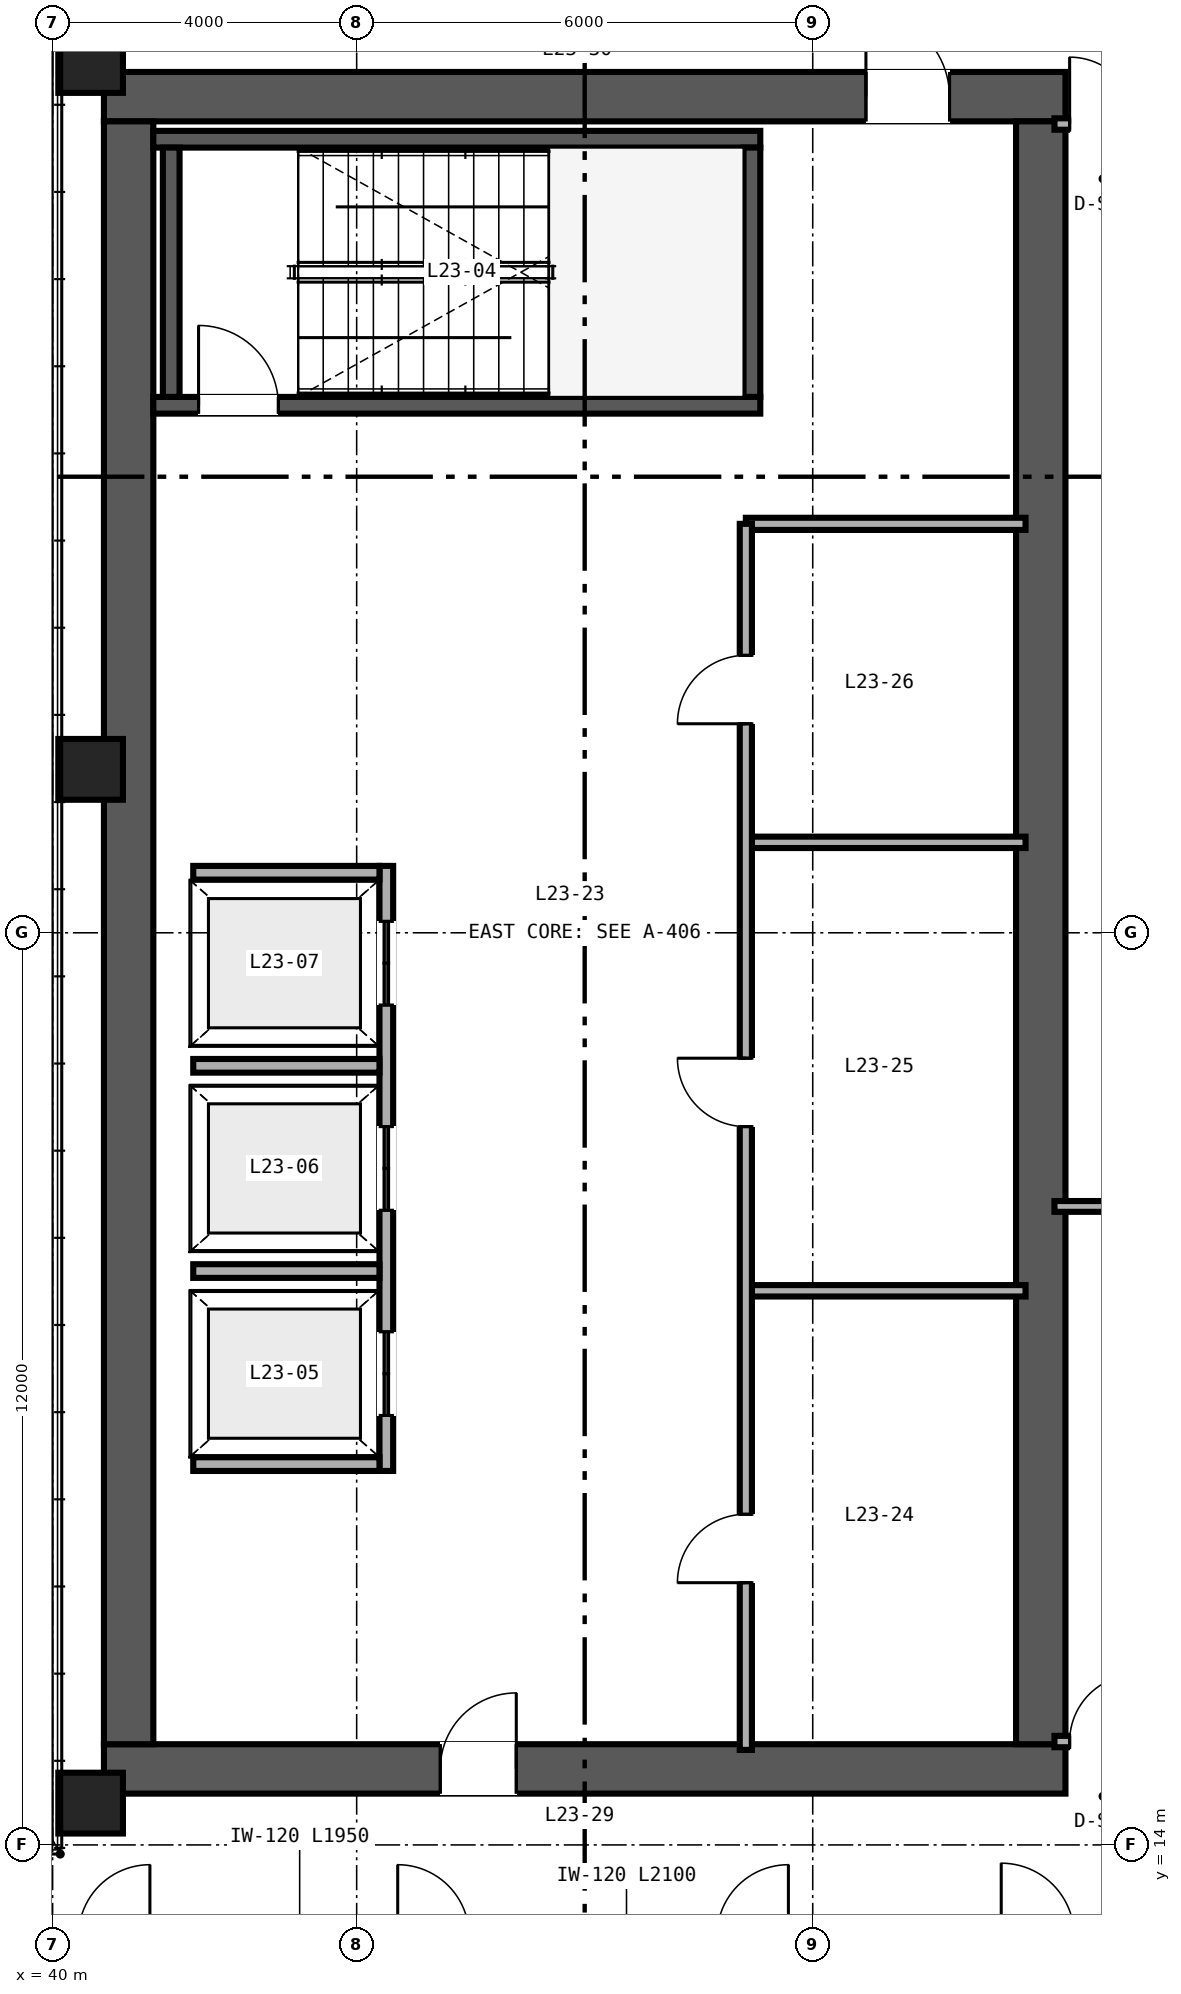
"""IFC4 building model, lengths in metres.
Left out: names, types, materials, properties, quantities, classifications, styles, units other than length and angle.
Written with IfcOpenShell. Run it as: python <this file> out.ifc"""

import sys

from ifc_helpers import new_model, si_unit, direction, frame, frame_2d, origin, origin_2d, place, context, subcontext, project, spatial, rectangle, hollow_rectangle, extrude, source, transform, mapped, element, fill, save


model = new_model("IFC4")
c1 = context("Model", 3, precision=1e-05, world=origin(), true_north=direction((0.0, 1.0)))
c2 = subcontext(c1, "Body", "Model", "MODEL_VIEW")
j1 = project(units=[si_unit("LENGTHUNIT", "METRE"), si_unit("PLANEANGLEUNIT", "RADIAN")], contexts=[c1])
p1 = place(None, origin())
s1 = spatial("IfcSite", under=j1, at=p1, CompositionType="ELEMENT")
p2 = place(p1, origin())
s2 = spatial("IfcBuilding", under=s1, at=p2, CompositionType="ELEMENT")
p3 = place(p2, frame((0.0, 0.0, 97.2)))
s3 = spatial("IfcBuildingStorey", under=s2, at=p3, CompositionType="ELEMENT", Elevation=97.2)
p4 = place(p3, frame((40.675, 15.0, 0.0), z_axis=(0.0, 0.0, 1.0), x_axis=(1.0, 0.0, 0.0)))
e1 = element("IfcWall", 1, at=p4, inside=s3, PredefinedType="SHEAR", context=c2, shape_type="SweptSolid", body=[
    extrude(rectangle(XDim=12.65, YDim=0.65, at=frame_2d((6.325, 0.0))), origin(), (0.0, 0.0, 1.0), 3.36),
])
p5 = place(p4, frame((4.425, 0.0, 0.0)))
e2 = element("IfcOpeningElement", 2, at=p5, cuts=e1, PredefinedType="OPENING", context=c2, shape_type="SweptSolid", body=[
    extrude(rectangle(XDim=1.0, YDim=2.15, at=frame_2d((0.5, 1.075))), frame((0.0, 0.335, 0.0), z_axis=(0.0, -1.0, 0.0), x_axis=(1.0, 0.0, 0.0)), (0.0, 0.0, 1.0), 0.67),
])
p6 = place(p3, frame((40.675, 37.0, 0.0), z_axis=(0.0, 0.0, 1.0), x_axis=(1.0, 0.0, 0.0)))
e3 = element("IfcWall", 3, at=p6, inside=s3, PredefinedType="SHEAR", context=c2, shape_type="SweptSolid", body=[
    extrude(rectangle(XDim=12.65, YDim=0.65, at=frame_2d((6.325, 0.0))), origin(), (0.0, 0.0, 1.0), 3.36),
])
p7 = place(p6, frame((10.025, 0.0, 0.0)))
e4 = element("IfcOpeningElement", 4, at=p7, cuts=e3, PredefinedType="OPENING", context=c2, shape_type="SweptSolid", body=[
    extrude(rectangle(XDim=1.1, YDim=2.15, at=frame_2d((0.55, 1.075))), frame((0.0, 0.335, 0.0), z_axis=(0.0, -1.0, 0.0), x_axis=(1.0, 0.0, 0.0)), (0.0, 0.0, 1.0), 0.67),
])
for number, where, z_axis, x_axis in (
    (5, (41.0, 15.325, 0.0), (0.0, 0.0, 1.0), (0.0, 1.0, 0.0)),
    (6, (53.0, 15.325, 0.0), (0.0, 0.0, 1.0), (0.0, 1.0, 0.0)),
):
    element("IfcWall", number, at=place(p3, frame(where, z_axis=z_axis, x_axis=x_axis)), inside=s3, PredefinedType="SHEAR", context=c2, shape_type="SweptSolid", body=[
        extrude(rectangle(XDim=21.35, YDim=0.65, at=frame_2d((10.675, 0.0))), origin(), (0.0, 0.0, 1.0), 3.36),
    ])
p8 = place(p3, frame((41.325, 32.94, 0.0), z_axis=(0.0, 0.0, 1.0), x_axis=(1.0, 0.0, 0.0)))
e7 = element("IfcWall", 7, at=p8, inside=s3, PredefinedType="SHEAR", context=c2, shape_type="SweptSolid", body=[
    extrude(rectangle(XDim=7.985, YDim=0.22, at=frame_2d((3.993, 0.0))), origin(), (0.0, 0.0, 1.0), 3.4),
])
p9 = place(p8, frame((0.595, 0.0, 0.0)))
e8 = element("IfcOpeningElement", 8, at=p9, cuts=e7, PredefinedType="OPENING", context=c2, shape_type="SweptSolid", body=[
    extrude(rectangle(XDim=1.05, YDim=2.15, at=frame_2d((0.525, 1.075))), frame((0.0, 0.12, 0.0), z_axis=(0.0, -1.0, 0.0), x_axis=(1.0, 0.0, 0.0)), (0.0, 0.0, 1.0), 0.24),
])
p10 = place(p3, frame((41.325, 36.44, 0.0), z_axis=(0.0, 0.0, 1.0), x_axis=(1.0, 0.0, 0.0)))
e9 = element("IfcWall", 9, at=p10, inside=s3, PredefinedType="SHEAR", context=c2, shape_type="SweptSolid", body=[
    extrude(rectangle(XDim=7.985, YDim=0.22, at=frame_2d((3.993, 0.0))), origin(), (0.0, 0.0, 1.0), 3.4),
])
for number, where, z_axis, x_axis in (
    (10, (41.56, 33.05, 0.0), (0.0, 0.0, 1.0), (0.0, 1.0, 0.0)),
    (11, (49.2, 33.05, 0.0), (0.0, 0.0, 1.0), (0.0, 1.0, 0.0)),
):
    element("IfcWall", number, at=place(p3, frame(where, z_axis=z_axis, x_axis=x_axis)), inside=s3, PredefinedType="SHEAR", context=c2, shape_type="SweptSolid", body=[
        extrude(rectangle(XDim=3.28, YDim=0.22, at=frame_2d((1.64, 0.0))), origin(), (0.0, 0.0, 1.0), 3.4),
    ])
m1 = source(origin(), c2, "Body", "SweptSolid", [
    extrude(hollow_rectangle(XDim=0.85, YDim=0.8, WallThickness=0.032, at=origin_2d()), origin(), (0.0, 0.0, 1.0), 3.36),
])
for number, where, z_axis, x_axis in (
    (12, (40.5, 14.55, 0.0), (0.0, 0.0, 1.0), (1.0, 0.0, 0.0)),
    (13, (40.5, 28.15, 0.0), (0.0, 0.0, 1.0), (1.0, 0.0, 0.0)),
    (14, (40.5, 37.45, 0.0), (0.0, 0.0, 1.0), (1.0, 0.0, 0.0)),
):
    element("IfcColumn", number, at=place(p3, frame(where, z_axis=z_axis, x_axis=x_axis)), inside=s3, PredefinedType="COLUMN", context=c2, shape_type="MappedRepresentation", body=[
        mapped(m1, transform((0.0, 0.0, 0.0), scale=1.0)),
    ])
p11 = place(p3, frame((44.39, 18.92, 0.0), z_axis=(0.0, 0.0, 1.0), x_axis=(0.0, 1.0, 0.0)))
e15 = element("IfcWall", 15, at=p11, inside=s3, PredefinedType="SOLIDWALL", context=c2, shape_type="SweptSolid", body=[
    extrude(rectangle(XDim=7.96, YDim=0.18, at=frame_2d((3.98, 0.0))), origin(), (0.0, 0.0, 1.0), 3.36),
])
p12 = place(p11, frame((0.73, 0.0, 0.0)))
e16 = element("IfcOpeningElement", 16, at=p12, cuts=e15, PredefinedType="OPENING", context=c2, shape_type="SweptSolid", body=[
    extrude(rectangle(XDim=1.1, YDim=2.2, at=frame_2d((0.55, 1.1))), frame((0.0, 0.1, 0.0), z_axis=(0.0, -1.0, 0.0), x_axis=(1.0, 0.0, 0.0)), (0.0, 0.0, 1.0), 0.2),
])
p13 = place(p11, frame((3.43, 0.0, 0.0)))
e17 = element("IfcOpeningElement", 17, at=p13, cuts=e15, PredefinedType="OPENING", context=c2, shape_type="SweptSolid", body=[
    extrude(rectangle(XDim=1.1, YDim=2.2, at=frame_2d((0.55, 1.1))), frame((0.0, 0.1, 0.0), z_axis=(0.0, -1.0, 0.0), x_axis=(1.0, 0.0, 0.0)), (0.0, 0.0, 1.0), 0.2),
])
p14 = place(p11, frame((6.13, 0.0, 0.0)))
e18 = element("IfcOpeningElement", 18, at=p14, cuts=e15, PredefinedType="OPENING", context=c2, shape_type="SweptSolid", body=[
    extrude(rectangle(XDim=1.1, YDim=2.2, at=frame_2d((0.55, 1.1))), frame((0.0, 0.1, 0.0), z_axis=(0.0, -1.0, 0.0), x_axis=(1.0, 0.0, 0.0)), (0.0, 0.0, 1.0), 0.2),
])
for number, where, z_axis, x_axis in (
    (19, (41.85, 19.01, 0.0), (0.0, 0.0, 1.0), (1.0, 0.0, 0.0)),
    (20, (41.85, 26.79, 0.0), (0.0, 0.0, 1.0), (1.0, 0.0, 0.0)),
    (21, (41.85, 21.55, 0.0), (0.0, 0.0, 1.0), (1.0, 0.0, 0.0)),
    (22, (41.85, 24.25, 0.0), (0.0, 0.0, 1.0), (1.0, 0.0, 0.0)),
):
    element("IfcWall", number, at=place(p3, frame(where, z_axis=z_axis, x_axis=x_axis)), inside=s3, PredefinedType="SOLIDWALL", context=c2, shape_type="SweptSolid", body=[
        extrude(rectangle(XDim=2.45, YDim=0.18, at=frame_2d((1.225, 0.0))), origin(), (0.0, 0.0, 1.0), 3.36),
    ])
p15 = place(p3, frame((49.12, 31.38, 0.0), z_axis=(0.0, 0.0, 1.0), x_axis=(1.0, 0.0, 0.0)))
e23 = element("IfcWall", 23, at=p15, inside=s3, PredefinedType="PARTITIONING", context=c2, shape_type="SweptSolid", body=[
    extrude(rectangle(XDim=3.68, YDim=0.16, at=frame_2d((1.84, 0.0))), origin(), (0.0, 0.0, 1.0), 2.36),
])
for number, where, z_axis, x_axis in (
    (24, (49.12, 21.29, 0.0), (0.0, 0.0, 1.0), (1.0, 0.0, 0.0)),
    (25, (49.12, 27.19, 0.0), (0.0, 0.0, 1.0), (1.0, 0.0, 0.0)),
):
    element("IfcWall", number, at=place(p3, frame(where, z_axis=z_axis, x_axis=x_axis)), inside=s3, PredefinedType="PARTITIONING", context=c2, shape_type="SweptSolid", body=[
        extrude(rectangle(XDim=3.68, YDim=0.15, at=frame_2d((1.84, 0.0))), origin(), (0.0, 0.0, 1.0), 3.36),
    ])
p16 = place(p3, frame((49.12, 15.25, 0.0), z_axis=(0.0, 0.0, 1.0), x_axis=(0.0, 1.0, 0.0)))
e26 = element("IfcWall", 26, at=p16, inside=s3, PredefinedType="PARTITIONING", context=c2, shape_type="SweptSolid", body=[
    extrude(rectangle(XDim=16.13, YDim=0.16, at=frame_2d((8.065, 0.0))), origin(), (0.0, 0.0, 1.0), 2.36),
])
p17 = place(p16, frame((2.2, 0.0, 0.0)))
e27 = element("IfcOpeningElement", 27, at=p17, cuts=e26, PredefinedType="OPENING", context=c2, shape_type="SweptSolid", body=[
    extrude(rectangle(XDim=0.9, YDim=2.15, at=frame_2d((0.45, 1.075))), frame((0.0, 0.09, 0.0), z_axis=(0.0, -1.0, 0.0), x_axis=(1.0, 0.0, 0.0)), (0.0, 0.0, 1.0), 0.18),
])
p18 = place(p16, frame((8.2, 0.0, 0.0)))
e28 = element("IfcOpeningElement", 28, at=p18, cuts=e26, PredefinedType="OPENING", context=c2, shape_type="SweptSolid", body=[
    extrude(rectangle(XDim=0.9, YDim=2.15, at=frame_2d((0.45, 1.075))), frame((0.0, 0.09, 0.0), z_axis=(0.0, -1.0, 0.0), x_axis=(1.0, 0.0, 0.0)), (0.0, 0.0, 1.0), 0.18),
])
p19 = place(p16, frame((13.5, 0.0, 0.0)))
e29 = element("IfcOpeningElement", 29, at=p19, cuts=e26, PredefinedType="OPENING", context=c2, shape_type="SweptSolid", body=[
    extrude(rectangle(XDim=0.9, YDim=2.15, at=frame_2d((0.45, 1.075))), frame((0.0, 0.09, 0.0), z_axis=(0.0, -1.0, 0.0), x_axis=(1.0, 0.0, 0.0)), (0.0, 0.0, 1.0), 0.18),
])
p20 = place(p3, frame((53.18, 15.36, 0.0), z_axis=(0.0, 0.0, 1.0), x_axis=(1.0, 0.0, 0.0)))
e30 = element("IfcWall", 30, at=p20, inside=s3, PredefinedType="PARTITIONING", context=c2, shape_type="SweptSolid", body=[
    extrude(rectangle(XDim=2.66, YDim=0.15, at=frame_2d((1.33, 0.0))), origin(), (0.0, 0.0, 1.0), 2.581),
])
p21 = place(p20, frame((0.2, 0.0, 0.0)))
e31 = element("IfcOpeningElement", 31, at=p21, cuts=e30, PredefinedType="OPENING", context=c2, shape_type="SweptSolid", body=[
    extrude(rectangle(XDim=0.88, YDim=2.15, at=frame_2d((0.44, 1.075))), frame((0.0, 0.085, 0.0), z_axis=(0.0, -1.0, 0.0), x_axis=(1.0, 0.0, 0.0)), (0.0, 0.0, 1.0), 0.17),
])
p22 = place(p3, frame((53.18, 36.64, 0.0), z_axis=(0.0, 0.0, 1.0), x_axis=(1.0, 0.0, 0.0)))
e32 = element("IfcWall", 32, at=p22, inside=s3, PredefinedType="PARTITIONING", context=c2, shape_type="SweptSolid", body=[
    extrude(rectangle(XDim=2.66, YDim=0.15, at=frame_2d((1.33, 0.0))), origin(), (0.0, 0.0, 1.0), 2.743),
])
p23 = place(p22, frame((0.2, 0.0, 0.0)))
e33 = element("IfcOpeningElement", 33, at=p23, cuts=e32, PredefinedType="OPENING", context=c2, shape_type="SweptSolid", body=[
    extrude(rectangle(XDim=0.88, YDim=2.15, at=frame_2d((0.44, 1.075))), frame((0.0, 0.085, 0.0), z_axis=(0.0, -1.0, 0.0), x_axis=(1.0, 0.0, 0.0)), (0.0, 0.0, 1.0), 0.17),
])
p24 = place(p3, frame((53.18, 22.4, 0.0), z_axis=(0.0, 0.0, 1.0), x_axis=(1.0, 0.0, 0.0)))
e34 = element("IfcWall", 34, at=p24, inside=s3, PredefinedType="PARTITIONING", context=c2, shape_type="SweptSolid", body=[
    extrude(rectangle(XDim=2.66, YDim=0.142, at=frame_2d((1.33, 0.0))), origin(), (0.0, 0.0, 1.0), 2.581),
])
m2 = source(origin(), c2, "Body", "SweptSolid", [
    extrude(rectangle(XDim=1.05, YDim=2.15, at=frame_2d((0.525, 1.075))), frame((0.0, 0.025, 0.0), z_axis=(0.0, -1.0, 0.0), x_axis=(1.0, 0.0, 0.0)), (0.0, 0.0, 1.0), 0.05),
])
p25 = place(p9, origin())
e35 = element("IfcDoor", 35, at=p25, inside=s3, OperationType="SINGLE_SWING_LEFT", PredefinedType="DOOR", context=c2, shape_type="MappedRepresentation", body=[
    mapped(m2, transform((0.0, 0.0, 0.0), scale=1.0)),
])
fill(e8, e35)
m3 = source(origin(), c2, "Body", "SweptSolid", [
    extrude(rectangle(XDim=1.1, YDim=2.2, at=frame_2d((0.55, 1.1))), frame((0.0, 0.025, 0.0), z_axis=(0.0, -1.0, 0.0), x_axis=(1.0, 0.0, 0.0)), (0.0, 0.0, 1.0), 0.05),
])
p26 = place(p12, origin())
e36 = element("IfcDoor", 36, at=p26, inside=s3, OperationType="DOUBLE_DOOR_SLIDING", PredefinedType="DOOR", context=c2, shape_type="MappedRepresentation", body=[
    mapped(m3, transform((0.0, 0.0, 0.0), scale=1.0)),
])
fill(e16, e36)
p27 = place(p13, origin())
e37 = element("IfcDoor", 37, at=p27, inside=s3, OperationType="DOUBLE_DOOR_SLIDING", PredefinedType="DOOR", context=c2, shape_type="MappedRepresentation", body=[
    mapped(m3, transform((0.0, 0.0, 0.0), scale=1.0)),
])
fill(e17, e37)
p28 = place(p14, origin())
e38 = element("IfcDoor", 38, at=p28, inside=s3, OperationType="DOUBLE_DOOR_SLIDING", PredefinedType="DOOR", context=c2, shape_type="MappedRepresentation", body=[
    mapped(m3, transform((0.0, 0.0, 0.0), scale=1.0)),
])
fill(e18, e38)
m4 = source(origin(), c2, "Body", "SweptSolid", [
    extrude(rectangle(XDim=1.0, YDim=2.15, at=frame_2d((0.5, 1.075))), frame((0.0, 0.025, 0.0), z_axis=(0.0, -1.0, 0.0), x_axis=(1.0, 0.0, 0.0)), (0.0, 0.0, 1.0), 0.05),
])
p29 = place(p5, origin())
e39 = element("IfcDoor", 39, at=p29, inside=s3, OperationType="SINGLE_SWING_RIGHT", PredefinedType="DOOR", context=c2, shape_type="MappedRepresentation", body=[
    mapped(m4, transform((0.0, 0.0, 0.0), scale=1.0)),
])
fill(e2, e39)
m5 = source(origin(), c2, "Body", "SweptSolid", [
    extrude(rectangle(XDim=1.1, YDim=2.15, at=frame_2d((0.55, 1.075))), frame((0.0, 0.025, 0.0), z_axis=(0.0, -1.0, 0.0), x_axis=(1.0, 0.0, 0.0)), (0.0, 0.0, 1.0), 0.05),
])
p30 = place(p7, origin())
e40 = element("IfcDoor", 40, at=p30, inside=s3, OperationType="SINGLE_SWING_LEFT", PredefinedType="DOOR", context=c2, shape_type="MappedRepresentation", body=[
    mapped(m5, transform((0.0, 0.0, 0.0), scale=1.0)),
])
fill(e4, e40)
m6 = source(origin(), c2, "Body", "SweptSolid", [
    extrude(rectangle(XDim=0.9, YDim=2.15, at=frame_2d((0.45, 1.075))), frame((0.0, 0.025, 0.0), z_axis=(0.0, -1.0, 0.0), x_axis=(1.0, 0.0, 0.0)), (0.0, 0.0, 1.0), 0.05),
])
p31 = place(p17, origin())
e41 = element("IfcDoor", 41, at=p31, inside=s3, OperationType="SINGLE_SWING_LEFT", PredefinedType="DOOR", context=c2, shape_type="MappedRepresentation", body=[
    mapped(m6, transform((0.0, 0.0, 0.0), scale=1.0)),
])
fill(e27, e41)
p32 = place(p18, origin())
e42 = element("IfcDoor", 42, at=p32, inside=s3, OperationType="SINGLE_SWING_RIGHT", PredefinedType="DOOR", context=c2, shape_type="MappedRepresentation", body=[
    mapped(m6, transform((0.0, 0.0, 0.0), scale=1.0)),
])
fill(e28, e42)
p33 = place(p19, origin())
e43 = element("IfcDoor", 43, at=p33, inside=s3, OperationType="SINGLE_SWING_LEFT", PredefinedType="DOOR", context=c2, shape_type="MappedRepresentation", body=[
    mapped(m6, transform((0.0, 0.0, 0.0), scale=1.0)),
])
fill(e29, e43)
m7 = source(origin(), c2, "Body", "SweptSolid", [
    extrude(rectangle(XDim=0.88, YDim=2.15, at=frame_2d((0.44, 1.075))), frame((0.0, 0.025, 0.0), z_axis=(0.0, -1.0, 0.0), x_axis=(1.0, 0.0, 0.0)), (0.0, 0.0, 1.0), 0.05),
])
p34 = place(p21, origin())
e44 = element("IfcDoor", 44, at=p34, inside=s3, OperationType="SINGLE_SWING_RIGHT", PredefinedType="DOOR", context=c2, shape_type="MappedRepresentation", body=[
    mapped(m7, transform((0.0, 0.0, 0.0), scale=1.0)),
])
fill(e31, e44)
p35 = place(p23, origin())
e45 = element("IfcDoor", 45, at=p35, inside=s3, OperationType="SINGLE_SWING_LEFT", PredefinedType="DOOR", context=c2, shape_type="MappedRepresentation", body=[
    mapped(m7, transform((0.0, 0.0, 0.0), scale=1.0)),
])
fill(e33, e45)
save(model, sys.argv[1])
